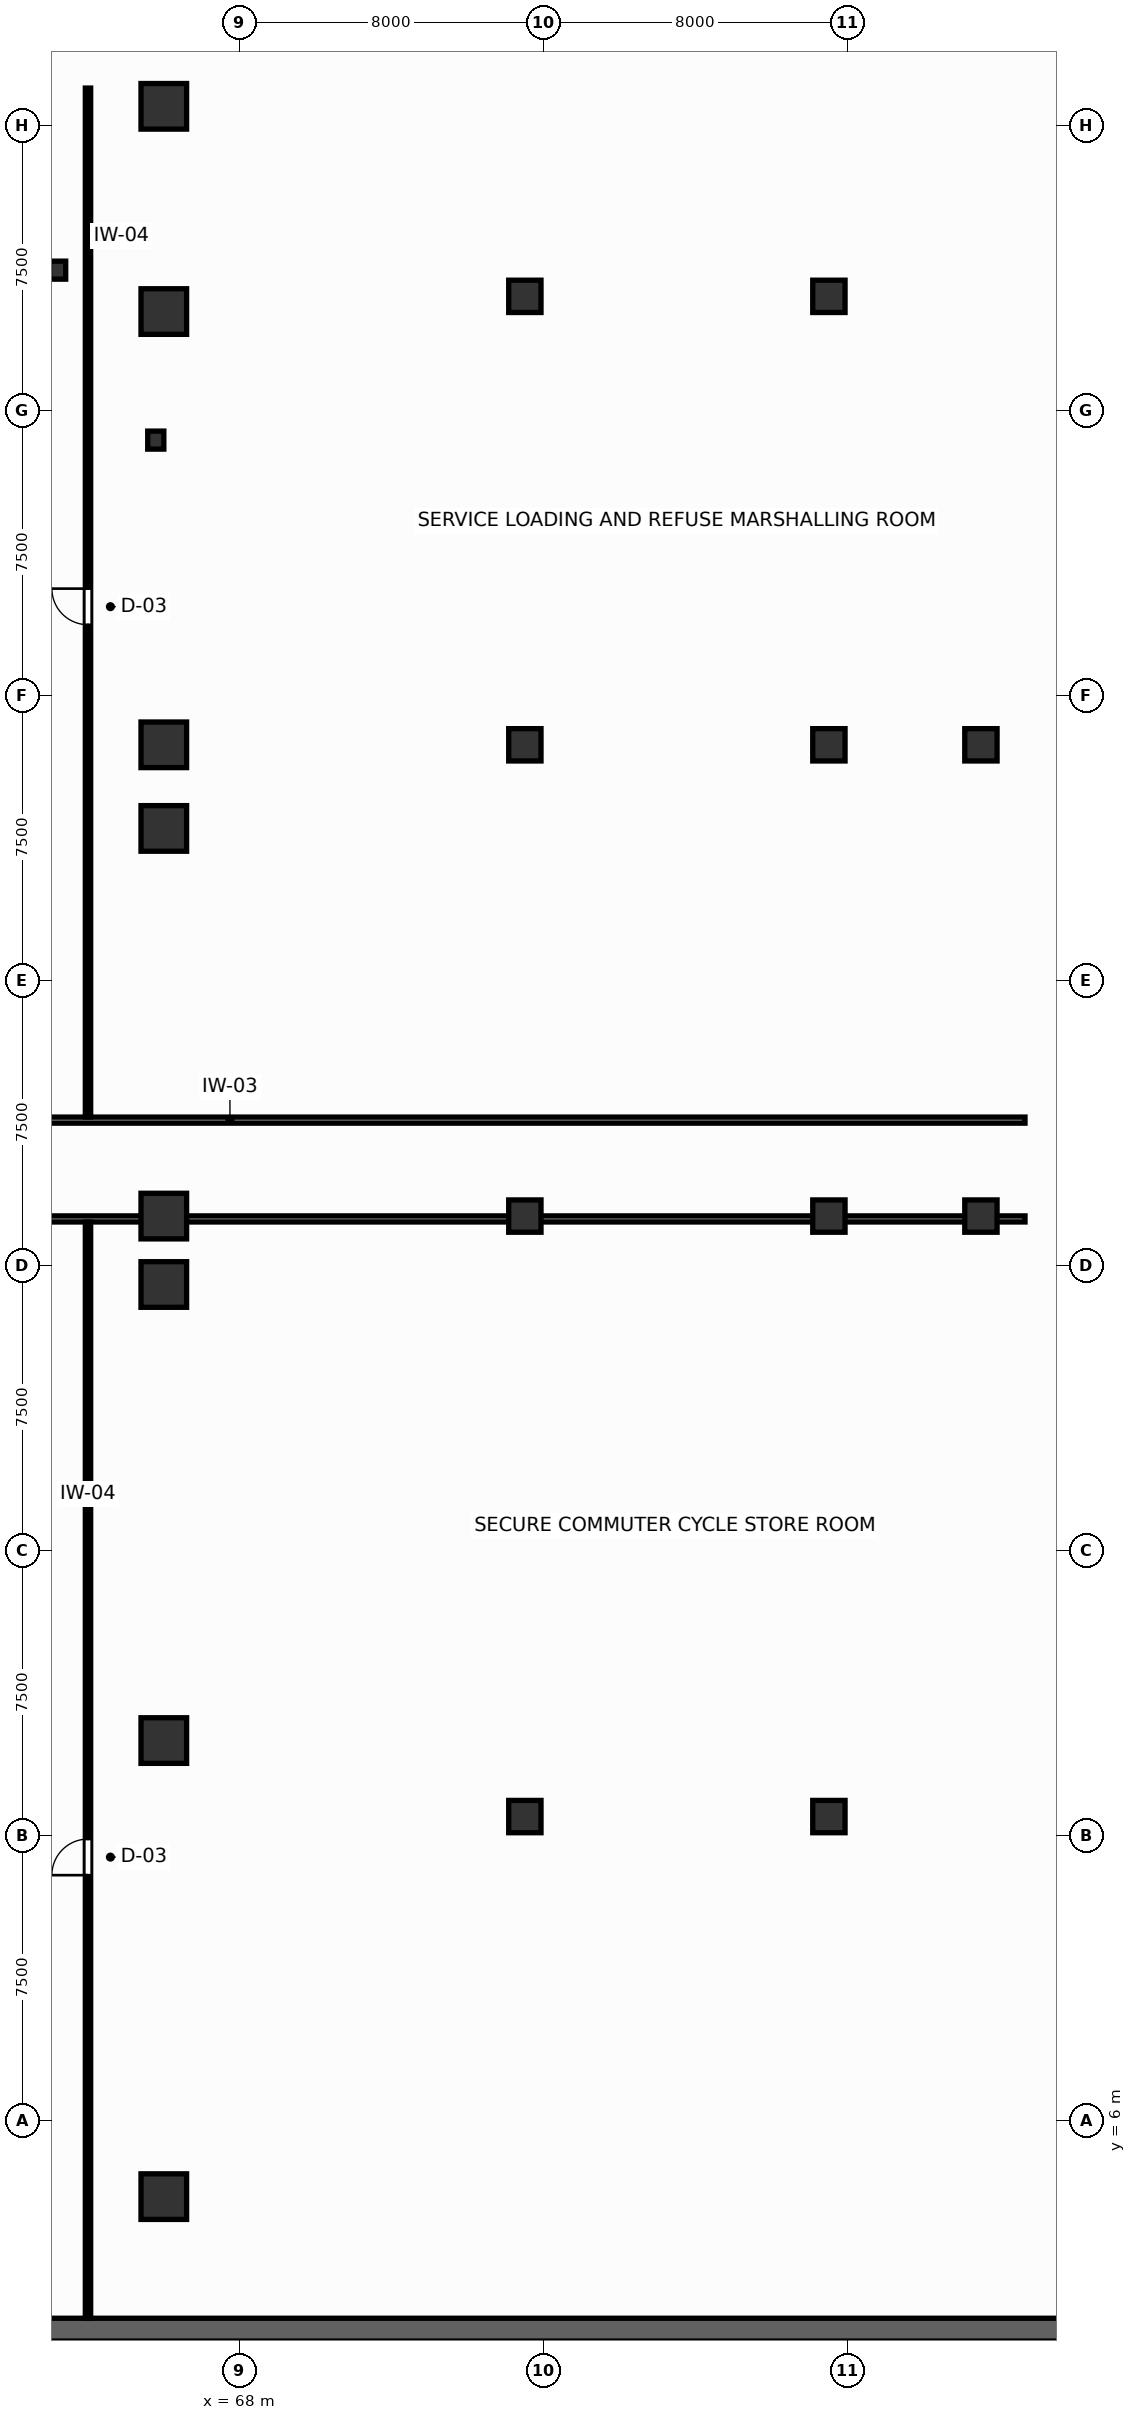
"""IFC4 building model, lengths in metres.
Left out: names, types, materials, properties, quantities, classifications, styles, units other than length and angle.
Written with IfcOpenShell. Run it as: python <this file> out.ifc"""

import sys

from ifc_helpers import new_model, si_unit, direction, frame, frame_2d, origin, origin_2d, place, context, subcontext, project, spatial, rectangle, i_section, extrude, source, transform, mapped, element, fill, save


model = new_model("IFC4")
c1 = context("Model", 3, precision=1e-05, world=origin(), true_north=direction((0.0, 1.0)))
c2 = subcontext(c1, "Body", "Model", "MODEL_VIEW")
j1 = project(units=[si_unit("LENGTHUNIT", "METRE"), si_unit("PLANEANGLEUNIT", "RADIAN")], contexts=[c1])
p1 = place(None, origin())
s1 = spatial("IfcSite", under=j1, at=p1, CompositionType="ELEMENT")
p2 = place(p1, origin())
s2 = spatial("IfcBuilding", under=s1, at=p2, CompositionType="ELEMENT")
p3 = place(p2, frame((0.0, 0.0, -4.5)))
s3 = spatial("IfcBuildingStorey", under=s2, at=p3, CompositionType="ELEMENT", Elevation=-4.5)
p4 = place(p3, frame((1.7, 0.5, 0.0), z_axis=(0.0, 0.0, 1.0), x_axis=(1.0, 0.0, 0.0)))
e1 = element("IfcWall", 1, at=p4, inside=s3, PredefinedType="SOLIDWALL", context=c2, shape_type="SweptSolid", body=[
    extrude(rectangle(XDim=87.98, YDim=0.6, at=frame_2d((43.99, 0.0))), origin(), (0.0, 0.0, 1.0), 4.5),
])
m1 = source(origin(), c2, "Body", "SweptSolid", [
    extrude(rectangle(XDim=1.2, YDim=1.2, at=origin_2d()), origin(), (0.0, 0.0, 1.0), 4.5),
])
for number, where, z_axis, x_axis in (
    (2, (66.0, 4.0, 0.0), (0.0, 0.0, 1.0), (1.0, 0.0, 0.0)),
    (3, (66.0, 16.0, 0.0), (0.0, 0.0, 1.0), (1.0, 0.0, 0.0)),
    (4, (66.0, 28.0, 0.0), (0.0, 0.0, 1.0), (1.0, 0.0, 0.0)),
    (5, (66.0, 40.0, 0.0), (0.0, 0.0, 1.0), (1.0, 0.0, 0.0)),
    (6, (66.0, 53.6, 0.0), (0.0, 0.0, 1.0), (1.0, 0.0, 0.0)),
    (7, (66.0, 59.0, 0.0), (0.0, 0.0, 1.0), (1.0, 0.0, 0.0)),
    (8, (66.0, 29.8, 0.0), (0.0, 0.0, 1.0), (1.0, 0.0, 0.0)),
    (9, (66.0, 42.2, 0.0), (0.0, 0.0, 1.0), (1.0, 0.0, 0.0)),
):
    element("IfcColumn", number, at=place(p3, frame(where, z_axis=z_axis, x_axis=x_axis)), inside=s3, PredefinedType="COLUMN", context=c2, shape_type="MappedRepresentation", body=[
        mapped(m1, transform((0.0, 0.0, 0.0), scale=1.0)),
    ])
m2 = source(origin(), c2, "Body", "SweptSolid", [
    extrude(i_section(OverallWidth=0.424, OverallDepth=0.474, WebThickness=0.045, FlangeThickness=0.072, FilletRadius=0.015, at=origin_2d()), origin(), (0.0, 0.0, 1.0), 4.5),
])
for number, where, z_axis, x_axis in (
    (10, (65.789, 50.217, 0.0), (0.0, 0.0, 1.0), (1.0, 0.0, 0.0)),
    (11, (63.207, 54.689, 0.0), (0.0, 0.0, 1.0), (1.0, 0.0, 0.0)),
):
    element("IfcColumn", number, at=place(p3, frame(where, z_axis=z_axis, x_axis=x_axis)), inside=s3, PredefinedType="COLUMN", context=c2, shape_type="MappedRepresentation", body=[
        mapped(m2, transform((0.0, 0.0, 0.0), scale=1.0)),
    ])
m3 = source(origin(), c2, "Body", "SweptSolid", [
    extrude(rectangle(XDim=0.85, YDim=0.85, at=origin_2d()), origin(), (0.0, 0.0, 1.0), 4.5),
])
for number, where, z_axis, x_axis in (
    (12, (75.5, 29.8, 0.0), (0.0, 0.0, 1.0), (1.0, 0.0, 0.0)),
    (13, (75.5, 42.2, 0.0), (0.0, 0.0, 1.0), (1.0, 0.0, 0.0)),
    (14, (83.5, 29.8, 0.0), (0.0, 0.0, 1.0), (1.0, 0.0, 0.0)),
    (15, (83.5, 42.2, 0.0), (0.0, 0.0, 1.0), (1.0, 0.0, 0.0)),
    (16, (87.5, 29.8, 0.0), (0.0, 0.0, 1.0), (1.0, 0.0, 0.0)),
    (17, (87.5, 42.2, 0.0), (0.0, 0.0, 1.0), (1.0, 0.0, 0.0)),
    (18, (75.5, 14.0, 0.0), (0.0, 0.0, 1.0), (1.0, 0.0, 0.0)),
    (19, (83.5, 14.0, 0.0), (0.0, 0.0, 1.0), (1.0, 0.0, 0.0)),
    (20, (75.5, 54.0, 0.0), (0.0, 0.0, 1.0), (1.0, 0.0, 0.0)),
    (21, (83.5, 54.0, 0.0), (0.0, 0.0, 1.0), (1.0, 0.0, 0.0)),
):
    element("IfcColumn", number, at=place(p3, frame(where, z_axis=z_axis, x_axis=x_axis)), inside=s3, PredefinedType="COLUMN", context=c2, shape_type="MappedRepresentation", body=[
        mapped(m3, transform((0.0, 0.0, 0.0), scale=1.0)),
    ])
p5 = place(p3, frame((2.302, 29.725, 0.0), z_axis=(0.0, 0.0, 1.0), x_axis=(1.0, 0.0, 0.0)))
e22 = element("IfcWall", 22, at=p5, inside=s3, PredefinedType="PARTITIONING", context=c2, shape_type="SweptSolid", body=[
    extrude(rectangle(XDim=86.358, YDim=0.16, at=frame_2d((43.179, 0.0))), origin(), (0.0, 0.0, 1.0), 3.73),
])
p6 = place(p5, frame((30.538, 0.0, 0.0)))
e23 = element("IfcOpeningElement", 23, at=p6, cuts=e22, PredefinedType="OPENING", context=c2, shape_type="SweptSolid", body=[
    extrude(rectangle(XDim=0.95, YDim=2.05, at=frame_2d((0.475, 1.025))), frame((0.0, 0.09, 0.0), z_axis=(0.0, -1.0, 0.0), x_axis=(1.0, 0.0, 0.0)), (0.0, 0.0, 1.0), 0.18),
])
p7 = place(p3, frame((46.82, 32.325, 0.0), z_axis=(0.0, 0.0, 1.0), x_axis=(1.0, 0.0, 0.0)))
e24 = element("IfcWall", 24, at=p7, inside=s3, PredefinedType="PARTITIONING", context=c2, shape_type="SweptSolid", body=[
    extrude(rectangle(XDim=41.84, YDim=0.16, at=frame_2d((20.92, 0.0))), origin(), (0.0, 0.0, 1.0), 3.52),
])
p8 = place(p3, frame((64.005, 0.802, 0.0), z_axis=(0.0, 0.0, 1.0), x_axis=(0.0, 1.0, 0.0)))
e25 = element("IfcWall", 25, at=p8, inside=s3, PredefinedType="PARTITIONING", context=c2, shape_type="SweptSolid", body=[
    extrude(rectangle(XDim=28.841, YDim=0.14, at=frame_2d((14.42, 0.0))), origin(), (0.0, 0.0, 1.0), 4.22),
])
p9 = place(p8, frame((11.656, 0.0, 0.0)))
e26 = element("IfcOpeningElement", 26, at=p9, cuts=e25, PredefinedType="OPENING", context=c2, shape_type="SweptSolid", body=[
    extrude(rectangle(XDim=0.95, YDim=2.05, at=frame_2d((0.475, 1.025))), frame((0.0, 0.08, 0.0), z_axis=(0.0, -1.0, 0.0), x_axis=(1.0, 0.0, 0.0)), (0.0, 0.0, 1.0), 0.16),
])
p10 = place(p3, frame((64.005, 32.407, 0.0), z_axis=(0.0, 0.0, 1.0), x_axis=(0.0, 1.0, 0.0)))
e27 = element("IfcWall", 27, at=p10, inside=s3, PredefinedType="PARTITIONING", context=c2, shape_type="SweptSolid", body=[
    extrude(rectangle(XDim=27.073, YDim=0.14, at=frame_2d((13.537, 0.0))), origin(), (0.0, 0.0, 1.0), 4.22),
])
p11 = place(p10, frame((12.953, 0.0, 0.0)))
e28 = element("IfcOpeningElement", 28, at=p11, cuts=e27, PredefinedType="OPENING", context=c2, shape_type="SweptSolid", body=[
    extrude(rectangle(XDim=0.95, YDim=2.05, at=frame_2d((0.475, 1.025))), frame((0.0, 0.08, 0.0), z_axis=(0.0, -1.0, 0.0), x_axis=(1.0, 0.0, 0.0)), (0.0, 0.0, 1.0), 0.16),
])
p12 = place(p9, origin())
e29 = element("IfcDoor", 29, at=p12, inside=s3, OperationType="SINGLE_SWING_LEFT", PredefinedType="DOOR", context=c2, shape_type="SweptSolid", body=[
    extrude(rectangle(XDim=0.95, YDim=2.05, at=frame_2d((0.475, 1.025))), frame((0.0, 0.025, 0.0), z_axis=(0.0, -1.0, 0.0), x_axis=(1.0, 0.0, 0.0)), (0.0, 0.0, 1.0), 0.05),
])
fill(e26, e29)
p13 = place(p11, origin())
e30 = element("IfcDoor", 30, at=p13, inside=s3, OperationType="SINGLE_SWING_RIGHT", PredefinedType="DOOR", context=c2, shape_type="SweptSolid", body=[
    extrude(rectangle(XDim=0.95, YDim=2.05, at=frame_2d((0.475, 1.025))), frame((0.0, 0.025, 0.0), z_axis=(0.0, -1.0, 0.0), x_axis=(1.0, 0.0, 0.0)), (0.0, 0.0, 1.0), 0.05),
])
fill(e28, e30)
save(model, sys.argv[1])
